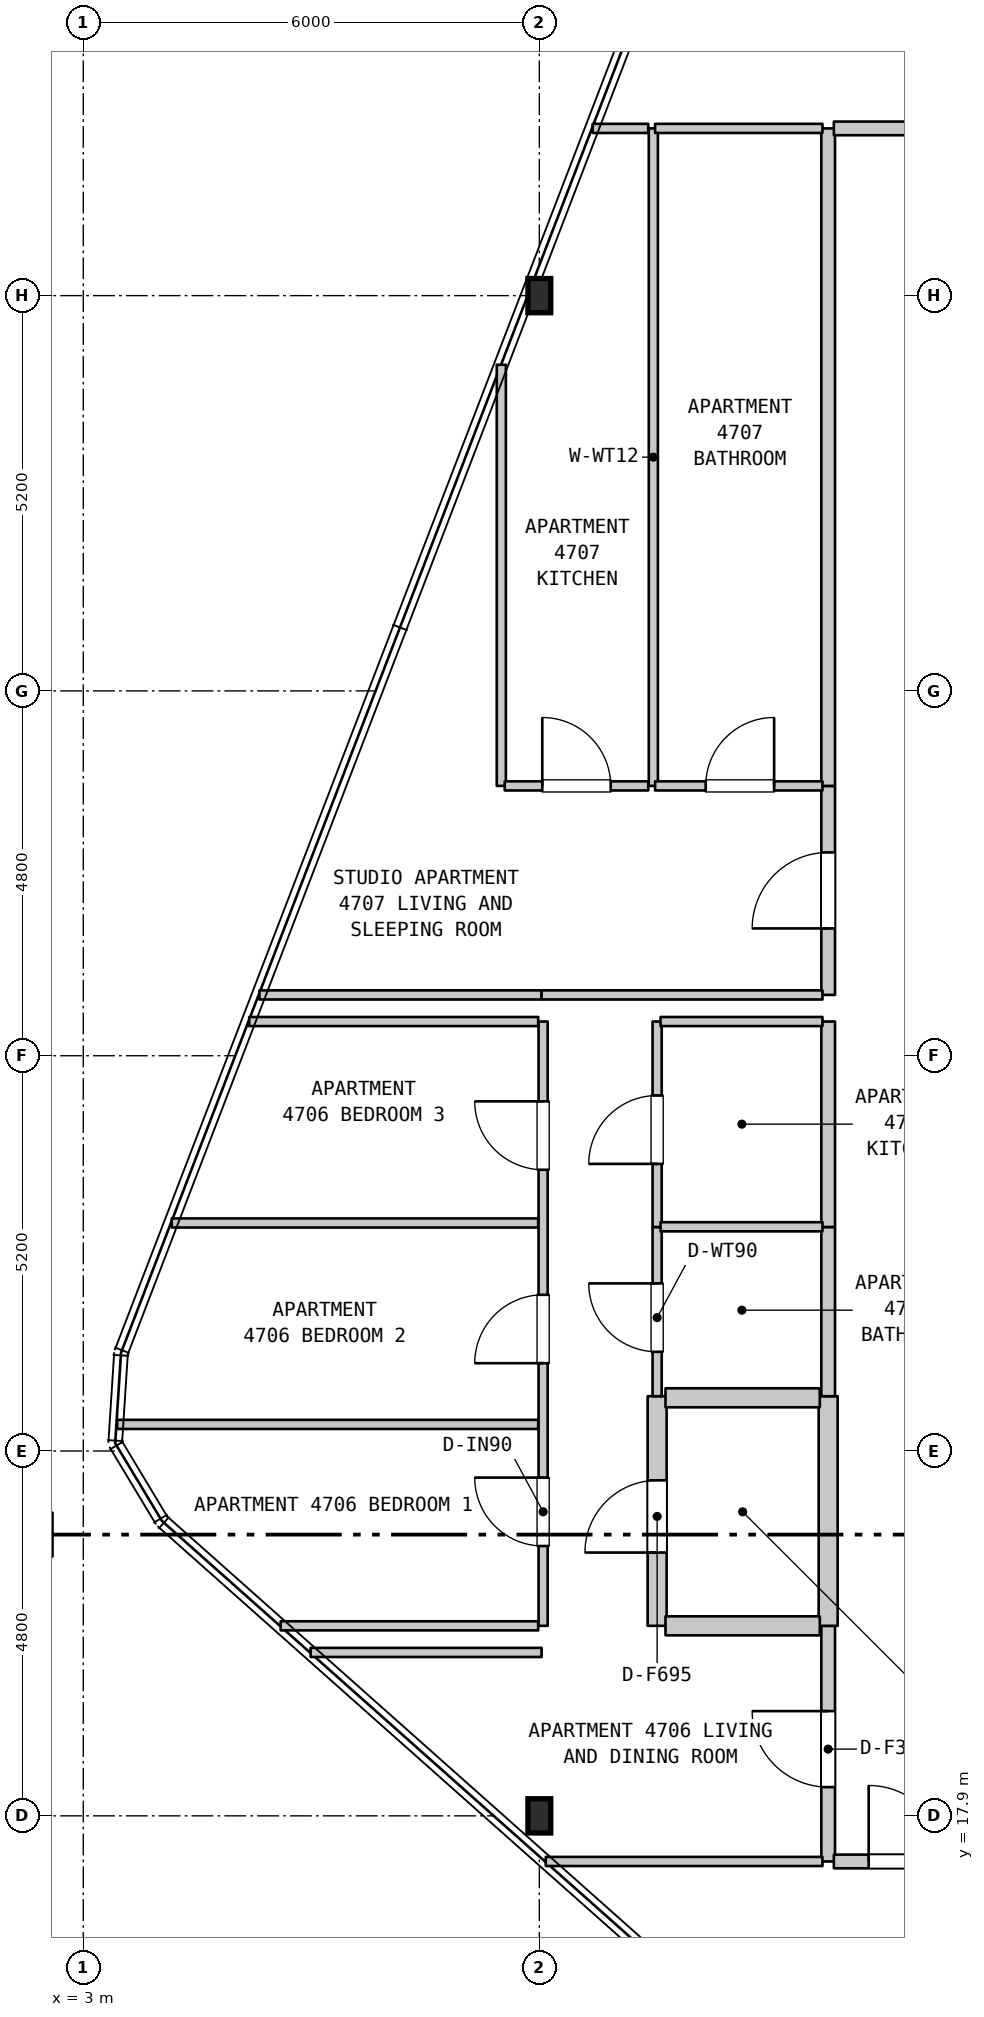
"""IFC4 building model, lengths in metres.
Left out: names, types, materials, properties, quantities, classifications, styles, units other than length and angle.
Written with IfcOpenShell. Run it as: python <this file> out.ifc"""

import sys

from ifc_helpers import new_model, si_unit, direction, frame, frame_2d, origin, origin_2d, place, context, subcontext, project, spatial, rectangle, i_section, extrude, element, fill, save


model = new_model("IFC4")
c1 = context("Model", 3, precision=1e-05, world=origin(), true_north=direction((0.0, 1.0)))
c2 = subcontext(c1, "Body", "Model", "MODEL_VIEW")
j1 = project(units=[si_unit("LENGTHUNIT", "METRE"), si_unit("PLANEANGLEUNIT", "RADIAN")], contexts=[c1])
p1 = place(None, origin())
s1 = spatial("IfcSite", under=j1, at=p1, CompositionType="ELEMENT")
p2 = place(p1, origin())
s2 = spatial("IfcBuilding", under=s1, at=p2, CompositionType="ELEMENT")
p3 = place(p2, frame((0.0, 0.0, 192.1)))
s3 = spatial("IfcBuildingStorey", under=s2, at=p3, CompositionType="ELEMENT", Elevation=192.1)
for number, where, z_axis, x_axis in (
    (1, (9.0, 17.9, 0.0), (0.0, 0.0, 1.0), (1.0, 0.0, 0.0)),
    (2, (9.0, 37.9, 0.0), (0.0, 0.0, 1.0), (1.0, 0.0, 0.0)),
):
    element("IfcColumn", number, at=place(p3, frame(where, z_axis=z_axis, x_axis=x_axis)), inside=s3, PredefinedType="COLUMN", context=c2, shape_type="SweptSolid", body=[
        extrude(i_section(OverallWidth=0.3, OverallDepth=0.45, WebThickness=0.014, FlangeThickness=0.026, FilletRadius=0.027, at=origin_2d()), origin(), (0.0, 0.0, 1.0), 3.7),
    ])
p4 = place(p3, frame((8.5, 31.45, 0.0), z_axis=(0.0, 0.0, 1.0), x_axis=(0.0, 1.0, 0.0)))
e3 = element("IfcWall", 3, at=p4, inside=s3, PredefinedType="PARTITIONING", context=c2, shape_type="SweptSolid", body=[
    extrude(rectangle(XDim=5.54, YDim=0.12, at=frame_2d((2.77, 0.0))), origin(), (0.0, 0.0, 1.0), 3.39),
])
p5 = place(p3, frame((9.05, 20.4, 0.0), z_axis=(0.0, 0.0, 1.0), x_axis=(0.0, 1.0, 0.0)))
e4 = element("IfcWall", 4, at=p5, inside=s3, PredefinedType="PARTITIONING", context=c2, shape_type="SweptSolid", body=[
    extrude(rectangle(XDim=7.95, YDim=0.12, at=frame_2d((3.975, 0.0))), origin(), (0.0, 0.0, 1.0), 2.79),
])
p6 = place(p5, frame((1.05, 0.0, 0.0)))
e5 = element("IfcOpeningElement", 5, at=p6, cuts=e4, PredefinedType="OPENING", context=c2, shape_type="SweptSolid", body=[
    extrude(rectangle(XDim=0.9, YDim=2.15, at=frame_2d((0.45, 1.075))), frame((0.0, 0.07, 0.0), z_axis=(0.0, -1.0, 0.0), x_axis=(1.0, 0.0, 0.0)), (0.0, 0.0, 1.0), 0.14),
])
p7 = place(p5, frame((3.455, 0.0, 0.0)))
e6 = element("IfcOpeningElement", 6, at=p7, cuts=e4, PredefinedType="OPENING", context=c2, shape_type="SweptSolid", body=[
    extrude(rectangle(XDim=0.9, YDim=2.15, at=frame_2d((0.45, 1.075))), frame((0.0, 0.07, 0.0), z_axis=(0.0, -1.0, 0.0), x_axis=(1.0, 0.0, 0.0)), (0.0, 0.0, 1.0), 0.14),
])
p8 = place(p5, frame((6.0, 0.0, 0.0)))
e7 = element("IfcOpeningElement", 7, at=p8, cuts=e4, PredefinedType="OPENING", context=c2, shape_type="SweptSolid", body=[
    extrude(rectangle(XDim=0.9, YDim=2.15, at=frame_2d((0.45, 1.075))), frame((0.0, 0.07, 0.0), z_axis=(0.0, -1.0, 0.0), x_axis=(1.0, 0.0, 0.0)), (0.0, 0.0, 1.0), 0.14),
])
p9 = place(p3, frame((10.5, 31.45, 0.0), z_axis=(0.0, 0.0, 1.0), x_axis=(0.0, 1.0, 0.0)))
e8 = element("IfcWall", 8, at=p9, inside=s3, PredefinedType="PARTITIONING", context=c2, shape_type="SweptSolid", body=[
    extrude(rectangle(XDim=8.65, YDim=0.12, at=frame_2d((4.325, 0.0))), origin(), (0.0, 0.0, 1.0), 3.39),
])
p10 = place(p3, frame((10.55, 20.4, 0.0), z_axis=(0.0, 0.0, 1.0), x_axis=(0.0, 1.0, 0.0)))
e9 = element("IfcWall", 9, at=p10, inside=s3, PredefinedType="STANDARD", context=c2, shape_type="SweptSolid", body=[
    extrude(rectangle(XDim=3.021, YDim=0.25, at=frame_2d((1.51, 0.0))), origin(), (0.0, 0.0, 1.0), 3.39),
])
p11 = place(p10, frame((0.964, 0.0, 0.0)))
e10 = element("IfcOpeningElement", 10, at=p11, cuts=e9, PredefinedType="OPENING", context=c2, shape_type="SweptSolid", body=[
    extrude(rectangle(XDim=0.95, YDim=2.15, at=frame_2d((0.475, 1.075))), frame((0.0, 0.135, 0.0), z_axis=(0.0, -1.0, 0.0), x_axis=(1.0, 0.0, 0.0)), (0.0, 0.0, 1.0), 0.27),
])
p12 = place(p3, frame((10.55, 23.421, 0.0), z_axis=(0.0, 0.0, 1.0), x_axis=(0.0, 1.0, 0.0)))
e11 = element("IfcWall", 11, at=p12, inside=s3, PredefinedType="PARTITIONING", context=c2, shape_type="SweptSolid", body=[
    extrude(rectangle(XDim=2.226, YDim=0.12, at=frame_2d((1.113, 0.0))), origin(), (0.0, 0.0, 1.0), 3.39),
])
p13 = place(p12, frame((0.584, 0.0, 0.0)))
e12 = element("IfcOpeningElement", 12, at=p13, cuts=e11, PredefinedType="OPENING", context=c2, shape_type="SweptSolid", body=[
    extrude(rectangle(XDim=0.9, YDim=2.1, at=frame_2d((0.45, 1.05))), frame((0.0, 0.07, 0.0), z_axis=(0.0, -1.0, 0.0), x_axis=(1.0, 0.0, 0.0)), (0.0, 0.0, 1.0), 0.14),
])
p14 = place(p3, frame((10.55, 25.647, 0.0), z_axis=(0.0, 0.0, 1.0), x_axis=(0.0, 1.0, 0.0)))
e13 = element("IfcWall", 13, at=p14, inside=s3, PredefinedType="PARTITIONING", context=c2, shape_type="SweptSolid", body=[
    extrude(rectangle(XDim=2.703, YDim=0.12, at=frame_2d((1.352, 0.0))), origin(), (0.0, 0.0, 1.0), 3.39),
])
p15 = place(p14, frame((0.83, 0.0, 0.0)))
e14 = element("IfcOpeningElement", 14, at=p15, cuts=e13, PredefinedType="OPENING", context=c2, shape_type="SweptSolid", body=[
    extrude(rectangle(XDim=0.9, YDim=2.15, at=frame_2d((0.45, 1.075))), frame((0.0, 0.07, 0.0), z_axis=(0.0, -1.0, 0.0), x_axis=(1.0, 0.0, 0.0)), (0.0, 0.0, 1.0), 0.14),
])
p16 = place(p3, frame((12.8, 17.3, 0.0), z_axis=(0.0, 0.0, 1.0), x_axis=(0.0, 1.0, 0.0)))
e15 = element("IfcWall", 15, at=p16, inside=s3, PredefinedType="STANDARD", context=c2, shape_type="SweptSolid", body=[
    extrude(rectangle(XDim=3.1, YDim=0.18, at=frame_2d((1.55, 0.0))), origin(), (0.0, 0.0, 1.0), 3.39),
])
p17 = place(p16, frame((0.978, 0.0, 0.0)))
e16 = element("IfcOpeningElement", 16, at=p17, cuts=e15, PredefinedType="OPENING", context=c2, shape_type="SweptSolid", body=[
    extrude(rectangle(XDim=1.0, YDim=2.15, at=frame_2d((0.5, 1.075))), frame((0.0, 0.1, 0.0), z_axis=(0.0, -1.0, 0.0), x_axis=(1.0, 0.0, 0.0)), (0.0, 0.0, 1.0), 0.2),
])
p18 = place(p3, frame((12.8, 20.4, 0.0), z_axis=(0.0, 0.0, 1.0), x_axis=(0.0, 1.0, 0.0)))
e17 = element("IfcWall", 17, at=p18, inside=s3, PredefinedType="STANDARD", context=c2, shape_type="SweptSolid", body=[
    extrude(rectangle(XDim=3.021, YDim=0.25, at=frame_2d((1.51, 0.0))), origin(), (0.0, 0.0, 1.0), 3.39),
])
p19 = place(p3, frame((12.8, 23.421, 0.0), z_axis=(0.0, 0.0, 1.0), x_axis=(0.0, 1.0, 0.0)))
e18 = element("IfcWall", 18, at=p19, inside=s3, PredefinedType="STANDARD", context=c2, shape_type="SweptSolid", body=[
    extrude(rectangle(XDim=2.226, YDim=0.18, at=frame_2d((1.113, 0.0))), origin(), (0.0, 0.0, 1.0), 3.39),
])
p20 = place(p3, frame((12.8, 25.647, 0.0), z_axis=(0.0, 0.0, 1.0), x_axis=(0.0, 1.0, 0.0)))
e19 = element("IfcWall", 19, at=p20, inside=s3, PredefinedType="STANDARD", context=c2, shape_type="SweptSolid", body=[
    extrude(rectangle(XDim=2.703, YDim=0.18, at=frame_2d((1.352, 0.0))), origin(), (0.0, 0.0, 1.0), 3.39),
])
p21 = place(p3, frame((12.8, 28.7, 0.0), z_axis=(0.0, 0.0, 1.0), x_axis=(0.0, 1.0, 0.0)))
e20 = element("IfcWall", 20, at=p21, inside=s3, PredefinedType="STANDARD", context=c2, shape_type="SweptSolid", body=[
    extrude(rectangle(XDim=2.75, YDim=0.18, at=frame_2d((1.375, 0.0))), origin(), (0.0, 0.0, 1.0), 3.39),
])
p22 = place(p21, frame((0.875, 0.0, 0.0)))
e21 = element("IfcOpeningElement", 21, at=p22, cuts=e20, PredefinedType="OPENING", context=c2, shape_type="SweptSolid", body=[
    extrude(rectangle(XDim=1.0, YDim=2.15, at=frame_2d((0.5, 1.075))), frame((0.0, 0.1, 0.0), z_axis=(0.0, -1.0, 0.0), x_axis=(1.0, 0.0, 0.0)), (0.0, 0.0, 1.0), 0.2),
])
p23 = place(p3, frame((12.8, 31.45, 0.0), z_axis=(0.0, 0.0, 1.0), x_axis=(0.0, 1.0, 0.0)))
e22 = element("IfcWall", 22, at=p23, inside=s3, PredefinedType="STANDARD", context=c2, shape_type="SweptSolid", body=[
    extrude(rectangle(XDim=8.65, YDim=0.18, at=frame_2d((4.325, 0.0))), origin(), (0.0, 0.0, 1.0), 3.39),
])
p24 = place(p3, frame((9.085, 17.3, 0.0), z_axis=(0.0, 0.0, 1.0), x_axis=(1.0, 0.0, 0.0)))
e23 = element("IfcWall", 23, at=p24, inside=s3, PredefinedType="PARTITIONING", context=c2, shape_type="SweptSolid", body=[
    extrude(rectangle(XDim=3.64, YDim=0.12, at=frame_2d((1.82, 0.0))), origin(), (0.0, 0.0, 1.0), 3.39),
])
p25 = place(p3, frame((12.875, 17.3, 0.0), z_axis=(0.0, 0.0, 1.0), x_axis=(1.0, 0.0, 0.0)))
e24 = element("IfcWall", 24, at=p25, inside=s3, PredefinedType="STANDARD", context=c2, shape_type="SweptSolid", body=[
    extrude(rectangle(XDim=3.78, YDim=0.18, at=frame_2d((1.89, 0.0))), origin(), (0.0, 0.0, 1.0), 3.39),
])
p26 = place(p25, frame((0.458, 0.0, 0.0)))
e25 = element("IfcOpeningElement", 25, at=p26, cuts=e24, PredefinedType="OPENING", context=c2, shape_type="SweptSolid", body=[
    extrude(rectangle(XDim=1.0, YDim=2.15, at=frame_2d((0.5, 1.075))), frame((0.0, 0.1, 0.0), z_axis=(0.0, -1.0, 0.0), x_axis=(1.0, 0.0, 0.0)), (0.0, 0.0, 1.0), 0.2),
])
p27 = place(p3, frame((5.991, 20.05, 0.0), z_axis=(0.0, 0.0, 1.0), x_axis=(1.0, 0.0, 0.0)))
e26 = element("IfcWall", 26, at=p27, inside=s3, PredefinedType="PARTITIONING", context=c2, shape_type="SweptSolid", body=[
    extrude(rectangle(XDim=3.039, YDim=0.12, at=frame_2d((1.52, 0.0))), origin(), (0.0, 0.0, 1.0), 3.39),
])
p28 = place(p3, frame((5.597, 20.4, 0.0), z_axis=(0.0, 0.0, 1.0), x_axis=(1.0, 0.0, 0.0)))
e27 = element("IfcWall", 27, at=p28, inside=s3, PredefinedType="PARTITIONING", context=c2, shape_type="SweptSolid", body=[
    extrude(rectangle(XDim=3.388, YDim=0.12, at=frame_2d((1.694, 0.0))), origin(), (0.0, 0.0, 1.0), 3.39),
])
p29 = place(p3, frame((10.66, 20.4, 0.0), z_axis=(0.0, 0.0, 1.0), x_axis=(1.0, 0.0, 0.0)))
e28 = element("IfcWall", 28, at=p29, inside=s3, PredefinedType="STANDARD", context=c2, shape_type="SweptSolid", body=[
    extrude(rectangle(XDim=2.03, YDim=0.25, at=frame_2d((1.015, 0.0))), origin(), (0.0, 0.0, 1.0), 3.39),
])
p30 = place(p3, frame((3.446, 23.05, 0.0), z_axis=(0.0, 0.0, 1.0), x_axis=(1.0, 0.0, 0.0)))
e29 = element("IfcWall", 29, at=p30, inside=s3, PredefinedType="PARTITIONING", context=c2, shape_type="SweptSolid", body=[
    extrude(rectangle(XDim=5.539, YDim=0.12, at=frame_2d((2.77, 0.0))), origin(), (0.0, 0.0, 1.0), 3.39),
])
p31 = place(p3, frame((10.66, 23.4, 0.0), z_axis=(0.0, 0.0, 1.0), x_axis=(1.0, 0.0, 0.0)))
e30 = element("IfcWall", 30, at=p31, inside=s3, PredefinedType="STANDARD", context=c2, shape_type="SweptSolid", body=[
    extrude(rectangle(XDim=2.03, YDim=0.25, at=frame_2d((1.015, 0.0))), origin(), (0.0, 0.0, 1.0), 3.39),
])
p32 = place(p3, frame((10.595, 25.65, 0.0), z_axis=(0.0, 0.0, 1.0), x_axis=(1.0, 0.0, 0.0)))
e31 = element("IfcWall", 31, at=p32, inside=s3, PredefinedType="PARTITIONING", context=c2, shape_type="SweptSolid", body=[
    extrude(rectangle(XDim=2.13, YDim=0.12, at=frame_2d((1.065, 0.0))), origin(), (0.0, 0.0, 1.0), 3.39),
])
p33 = place(p3, frame((4.164, 25.7, 0.0), z_axis=(0.0, 0.0, 1.0), x_axis=(1.0, 0.0, 0.0)))
e32 = element("IfcWall", 32, at=p33, inside=s3, PredefinedType="PARTITIONING", context=c2, shape_type="SweptSolid", body=[
    extrude(rectangle(XDim=4.821, YDim=0.12, at=frame_2d((2.411, 0.0))), origin(), (0.0, 0.0, 1.0), 3.39),
])
p34 = place(p3, frame((5.183, 28.35, 0.0), z_axis=(0.0, 0.0, 1.0), x_axis=(1.0, 0.0, 0.0)))
e33 = element("IfcWall", 33, at=p34, inside=s3, PredefinedType="PARTITIONING", context=c2, shape_type="SweptSolid", body=[
    extrude(rectangle(XDim=3.802, YDim=0.12, at=frame_2d((1.901, 0.0))), origin(), (0.0, 0.0, 1.0), 3.39),
])
p35 = place(p3, frame((10.595, 28.35, 0.0), z_axis=(0.0, 0.0, 1.0), x_axis=(1.0, 0.0, 0.0)))
e34 = element("IfcWall", 34, at=p35, inside=s3, PredefinedType="PARTITIONING", context=c2, shape_type="SweptSolid", body=[
    extrude(rectangle(XDim=2.13, YDim=0.12, at=frame_2d((1.065, 0.0))), origin(), (0.0, 0.0, 1.0), 3.39),
])
p36 = place(p3, frame((5.317, 28.7, 0.0), z_axis=(0.0, 0.0, 1.0), x_axis=(1.0, 0.0, 0.0)))
e35 = element("IfcWall", 35, at=p36, inside=s3, PredefinedType="PARTITIONING", context=c2, shape_type="SweptSolid", body=[
    extrude(rectangle(XDim=3.713, YDim=0.12, at=frame_2d((1.856, 0.0))), origin(), (0.0, 0.0, 1.0), 3.39),
])
p37 = place(p3, frame((9.03, 28.7, 0.0), z_axis=(0.0, 0.0, 1.0), x_axis=(1.0, 0.0, 0.0)))
e36 = element("IfcWall", 36, at=p37, inside=s3, PredefinedType="PARTITIONING", context=c2, shape_type="SweptSolid", body=[
    extrude(rectangle(XDim=3.695, YDim=0.12, at=frame_2d((1.848, 0.0))), origin(), (0.0, 0.0, 1.0), 3.39),
])
p38 = place(p3, frame((8.545, 31.45, 0.0), z_axis=(0.0, 0.0, 1.0), x_axis=(1.0, 0.0, 0.0)))
e37 = element("IfcWall", 37, at=p38, inside=s3, PredefinedType="PARTITIONING", context=c2, shape_type="SweptSolid", body=[
    extrude(rectangle(XDim=1.888, YDim=0.12, at=frame_2d((0.944, 0.0))), origin(), (0.0, 0.0, 1.0), 3.39),
])
p39 = place(p38, frame((0.494, 0.0, 0.0)))
e38 = element("IfcOpeningElement", 38, at=p39, cuts=e37, PredefinedType="OPENING", context=c2, shape_type="SweptSolid", body=[
    extrude(rectangle(XDim=0.9, YDim=2.15, at=frame_2d((0.45, 1.075))), frame((0.0, 0.07, 0.0), z_axis=(0.0, -1.0, 0.0), x_axis=(1.0, 0.0, 0.0)), (0.0, 0.0, 1.0), 0.14),
])
p40 = place(p3, frame((10.523, 31.45, 0.0), z_axis=(0.0, 0.0, 1.0), x_axis=(1.0, 0.0, 0.0)))
e39 = element("IfcWall", 39, at=p40, inside=s3, PredefinedType="PARTITIONING", context=c2, shape_type="SweptSolid", body=[
    extrude(rectangle(XDim=2.202, YDim=0.12, at=frame_2d((1.101, 0.0))), origin(), (0.0, 0.0, 1.0), 3.39),
])
p41 = place(p40, frame((0.666, 0.0, 0.0)))
e40 = element("IfcOpeningElement", 40, at=p41, cuts=e39, PredefinedType="OPENING", context=c2, shape_type="SweptSolid", body=[
    extrude(rectangle(XDim=0.9, YDim=2.1, at=frame_2d((0.45, 1.05))), frame((0.0, 0.07, 0.0), z_axis=(0.0, -1.0, 0.0), x_axis=(1.0, 0.0, 0.0)), (0.0, 0.0, 1.0), 0.14),
])
p42 = place(p3, frame((9.702, 40.1, 0.0), z_axis=(0.0, 0.0, 1.0), x_axis=(1.0, 0.0, 0.0)))
e41 = element("IfcWall", 41, at=p42, inside=s3, PredefinedType="PARTITIONING", context=c2, shape_type="SweptSolid", body=[
    extrude(rectangle(XDim=0.731, YDim=0.12, at=frame_2d((0.366, 0.0))), origin(), (0.0, 0.0, 1.0), 3.39),
])
p43 = place(p3, frame((10.523, 40.1, 0.0), z_axis=(0.0, 0.0, 1.0), x_axis=(1.0, 0.0, 0.0)))
e42 = element("IfcWall", 42, at=p43, inside=s3, PredefinedType="PARTITIONING", context=c2, shape_type="SweptSolid", body=[
    extrude(rectangle(XDim=2.202, YDim=0.12, at=frame_2d((1.101, 0.0))), origin(), (0.0, 0.0, 1.0), 3.39),
])
p44 = place(p3, frame((12.875, 40.1, 0.0), z_axis=(0.0, 0.0, 1.0), x_axis=(1.0, 0.0, 0.0)))
e43 = element("IfcWall", 43, at=p44, inside=s3, PredefinedType="STANDARD", context=c2, shape_type="SweptSolid", body=[
    extrude(rectangle(XDim=1.48, YDim=0.18, at=frame_2d((0.74, 0.0))), origin(), (0.0, 0.0, 1.0), 3.39),
])
p45 = place(p6, origin())
e44 = element("IfcDoor", 44, at=p45, inside=s3, OperationType="SINGLE_SWING_RIGHT", PredefinedType="DOOR", context=c2, shape_type="SweptSolid", body=[
    extrude(rectangle(XDim=0.9, YDim=2.15, at=frame_2d((0.45, 1.075))), frame((0.0, 0.025, 0.0), z_axis=(0.0, -1.0, 0.0), x_axis=(1.0, 0.0, 0.0)), (0.0, 0.0, 1.0), 0.05),
])
fill(e5, e44)
p46 = place(p7, origin())
e45 = element("IfcDoor", 45, at=p46, inside=s3, OperationType="SINGLE_SWING_LEFT", PredefinedType="DOOR", context=c2, shape_type="SweptSolid", body=[
    extrude(rectangle(XDim=0.9, YDim=2.15, at=frame_2d((0.45, 1.075))), frame((0.0, 0.025, 0.0), z_axis=(0.0, -1.0, 0.0), x_axis=(1.0, 0.0, 0.0)), (0.0, 0.0, 1.0), 0.05),
])
fill(e6, e45)
p47 = place(p8, origin())
e46 = element("IfcDoor", 46, at=p47, inside=s3, OperationType="SINGLE_SWING_RIGHT", PredefinedType="DOOR", context=c2, shape_type="SweptSolid", body=[
    extrude(rectangle(XDim=0.9, YDim=2.15, at=frame_2d((0.45, 1.075))), frame((0.0, 0.025, 0.0), z_axis=(0.0, -1.0, 0.0), x_axis=(1.0, 0.0, 0.0)), (0.0, 0.0, 1.0), 0.05),
])
fill(e7, e46)
p48 = place(p11, origin())
e47 = element("IfcDoor", 47, at=p48, inside=s3, OperationType="SINGLE_SWING_LEFT", PredefinedType="DOOR", context=c2, shape_type="SweptSolid", body=[
    extrude(rectangle(XDim=0.95, YDim=2.15, at=frame_2d((0.475, 1.075))), frame((0.0, 0.025, 0.0), z_axis=(0.0, -1.0, 0.0), x_axis=(1.0, 0.0, 0.0)), (0.0, 0.0, 1.0), 0.05),
])
fill(e10, e47)
p49 = place(p13, origin())
e48 = element("IfcDoor", 48, at=p49, inside=s3, OperationType="SINGLE_SWING_RIGHT", PredefinedType="DOOR", context=c2, shape_type="SweptSolid", body=[
    extrude(rectangle(XDim=0.9, YDim=2.1, at=frame_2d((0.45, 1.05))), frame((0.0, 0.025, 0.0), z_axis=(0.0, -1.0, 0.0), x_axis=(1.0, 0.0, 0.0)), (0.0, 0.0, 1.0), 0.05),
])
fill(e12, e48)
p50 = place(p15, origin())
e49 = element("IfcDoor", 49, at=p50, inside=s3, OperationType="SINGLE_SWING_LEFT", PredefinedType="DOOR", context=c2, shape_type="SweptSolid", body=[
    extrude(rectangle(XDim=0.9, YDim=2.15, at=frame_2d((0.45, 1.075))), frame((0.0, 0.025, 0.0), z_axis=(0.0, -1.0, 0.0), x_axis=(1.0, 0.0, 0.0)), (0.0, 0.0, 1.0), 0.05),
])
fill(e14, e49)
p51 = place(p17, origin())
e50 = element("IfcDoor", 50, at=p51, inside=s3, OperationType="SINGLE_SWING_RIGHT", PredefinedType="DOOR", context=c2, shape_type="SweptSolid", body=[
    extrude(rectangle(XDim=1.0, YDim=2.15, at=frame_2d((0.5, 1.075))), frame((0.0, 0.025, 0.0), z_axis=(0.0, -1.0, 0.0), x_axis=(1.0, 0.0, 0.0)), (0.0, 0.0, 1.0), 0.05),
])
fill(e16, e50)
p52 = place(p22, origin())
e51 = element("IfcDoor", 51, at=p52, inside=s3, OperationType="SINGLE_SWING_LEFT", PredefinedType="DOOR", context=c2, shape_type="SweptSolid", body=[
    extrude(rectangle(XDim=1.0, YDim=2.15, at=frame_2d((0.5, 1.075))), frame((0.0, 0.025, 0.0), z_axis=(0.0, -1.0, 0.0), x_axis=(1.0, 0.0, 0.0)), (0.0, 0.0, 1.0), 0.05),
])
fill(e21, e51)
p53 = place(p26, origin())
e52 = element("IfcDoor", 52, at=p53, inside=s3, OperationType="SINGLE_SWING_LEFT", PredefinedType="DOOR", context=c2, shape_type="SweptSolid", body=[
    extrude(rectangle(XDim=1.0, YDim=2.15, at=frame_2d((0.5, 1.075))), frame((0.0, 0.025, 0.0), z_axis=(0.0, -1.0, 0.0), x_axis=(1.0, 0.0, 0.0)), (0.0, 0.0, 1.0), 0.05),
])
fill(e25, e52)
p54 = place(p39, origin())
e53 = element("IfcDoor", 53, at=p54, inside=s3, OperationType="SINGLE_SWING_LEFT", PredefinedType="DOOR", context=c2, shape_type="SweptSolid", body=[
    extrude(rectangle(XDim=0.9, YDim=2.15, at=frame_2d((0.45, 1.075))), frame((0.0, 0.025, 0.0), z_axis=(0.0, -1.0, 0.0), x_axis=(1.0, 0.0, 0.0)), (0.0, 0.0, 1.0), 0.05),
])
fill(e38, e53)
p55 = place(p41, origin())
e54 = element("IfcDoor", 54, at=p55, inside=s3, OperationType="SINGLE_SWING_RIGHT", PredefinedType="DOOR", context=c2, shape_type="SweptSolid", body=[
    extrude(rectangle(XDim=0.9, YDim=2.1, at=frame_2d((0.45, 1.05))), frame((0.0, 0.025, 0.0), z_axis=(0.0, -1.0, 0.0), x_axis=(1.0, 0.0, 0.0)), (0.0, 0.0, 1.0), 0.05),
])
fill(e40, e54)
save(model, sys.argv[1])
